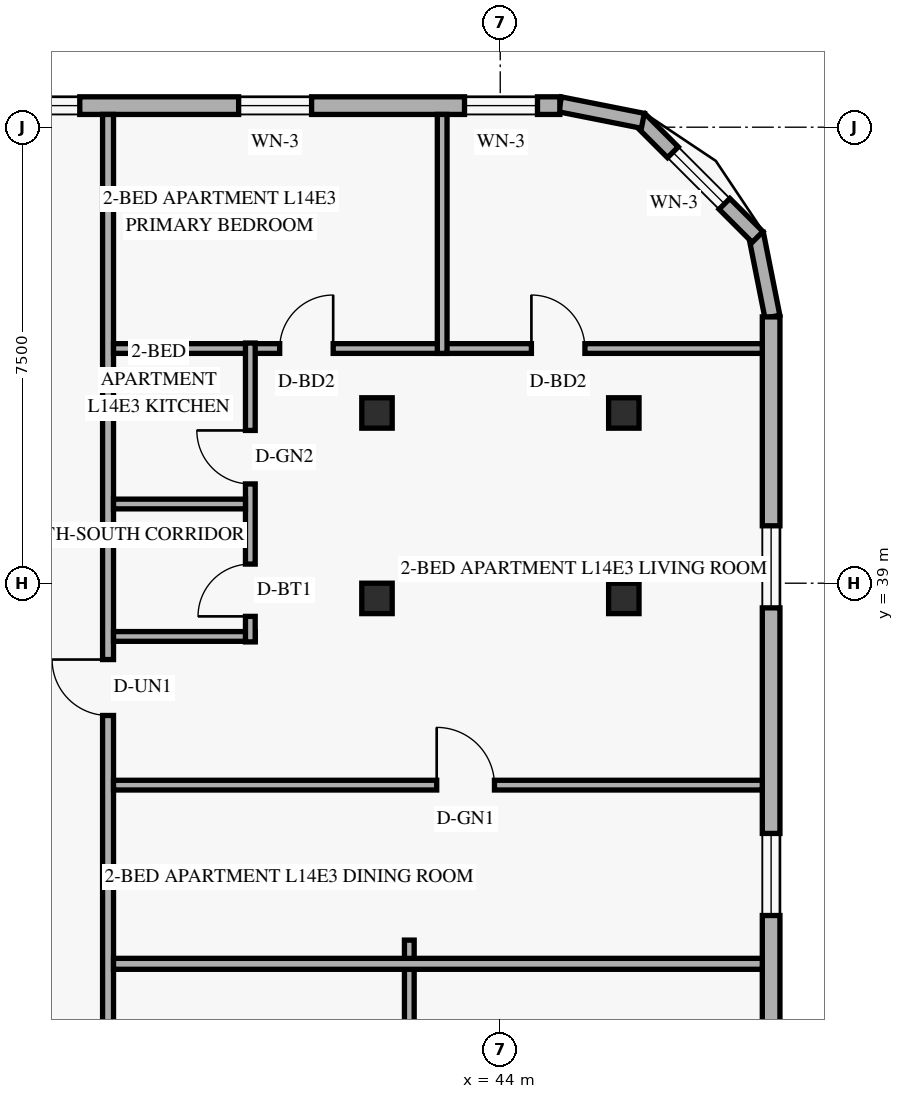
"""IFC4 building model, lengths in metres.
Left out: names, types, materials, properties, quantities, classifications, styles, units other than length and angle.
Written with IfcOpenShell. Run it as: python <this file> out.ifc"""

import sys

from ifc_helpers import new_model, si_unit, direction, frame, frame_2d, origin, origin_2d, place, context, subcontext, project, spatial, rectangle, hollow_rectangle, extrude, element, fill, save


model = new_model("IFC4")
c1 = context("Model", 3, precision=1e-05, world=origin(), true_north=direction((0.0, 1.0)))
c2 = subcontext(c1, "Body", "Model", "MODEL_VIEW")
j1 = project(units=[si_unit("LENGTHUNIT", "METRE"), si_unit("PLANEANGLEUNIT", "RADIAN")], contexts=[c1])
p1 = place(None, origin())
s1 = spatial("IfcSite", under=j1, at=p1, CompositionType="ELEMENT")
p2 = place(p1, origin())
s2 = spatial("IfcBuilding", under=s1, at=p2, CompositionType="ELEMENT")
p3 = place(p2, frame((0.0, 0.0, 56.4)))
s3 = spatial("IfcBuildingStorey", under=s2, at=p3, CompositionType="ELEMENT", Elevation=56.4)
for number, where, z_axis, x_axis in (
    (1, (41.91, 38.75, 0.0), (0.035, 0.0, 0.999), (0.0, 1.0, 0.0)),
    (2, (41.91, 41.8, 0.0), (0.035, 0.0, 0.999), (0.0, 1.0, 0.0)),
):
    element("IfcColumn", number, at=place(p3, frame(where, z_axis=z_axis, x_axis=x_axis)), inside=s3, PredefinedType="COLUMN", context=c2, shape_type="SweptSolid", body=[
        extrude(hollow_rectangle(XDim=0.5, YDim=0.5, WallThickness=0.022, at=origin_2d()), origin(), (0.0, 0.0, 1.0), 3.602),
    ])
for number, where, z_axis, x_axis in (
    (3, (45.928, 38.75, 0.0), (0.058, 0.0, 0.998), (0.0, 1.0, 0.0)),
    (4, (45.928, 41.8, 0.0), (0.058, 0.0, 0.998), (0.0, 1.0, 0.0)),
):
    element("IfcColumn", number, at=place(p3, frame(where, z_axis=z_axis, x_axis=x_axis)), inside=s3, PredefinedType="COLUMN", context=c2, shape_type="SweptSolid", body=[
        extrude(hollow_rectangle(XDim=0.5, YDim=0.5, WallThickness=0.022, at=origin_2d()), origin(), (0.0, 0.0, 1.0), 3.606),
    ])
p4 = place(p3, frame((48.476, 43.384, 0.0), z_axis=(0.0, 0.0, 1.0), x_axis=(-0.19496651342, 0.980809899341, 0.0)))
e5 = element("IfcWall", 5, at=p4, inside=s3, PredefinedType="SOLIDWALL", context=c2, shape_type="SweptSolid", body=[
    extrude(rectangle(XDim=1.389, YDim=0.25, at=frame_2d((0.694, 0.0))), origin(), (0.0, 0.0, 1.0), 3.35),
])
p5 = place(p3, frame((48.232, 44.695, 0.0), z_axis=(0.0, 0.0, 1.0), x_axis=(-0.707106781187, 0.707106781187, 0.0)))
e6 = element("IfcWall", 6, at=p5, inside=s3, PredefinedType="SOLIDWALL", context=c2, shape_type="SweptSolid", body=[
    extrude(rectangle(XDim=2.739, YDim=0.25, at=frame_2d((1.37, 0.0))), origin(), (0.0, 0.0, 1.0), 3.35),
])
p6 = place(p5, frame((0.77, 0.0, 0.85)))
e7 = element("IfcOpeningElement", 7, at=p6, cuts=e6, PredefinedType="OPENING", context=c2, shape_type="SweptSolid", body=[
    extrude(rectangle(XDim=1.2, YDim=1.5, at=frame_2d((0.6, 0.75))), frame((0.0, 0.135, 0.0), z_axis=(0.0, -1.0, 0.0), x_axis=(1.0, 0.0, 0.0)), (0.0, 0.0, 1.0), 0.27),
])
p7 = place(p3, frame((46.345, 46.605, 0.0), z_axis=(0.0, 0.0, 1.0), x_axis=(-0.980809899341, 0.19496651342, 0.0)))
e8 = element("IfcWall", 8, at=p7, inside=s3, PredefinedType="SOLIDWALL", context=c2, shape_type="SweptSolid", body=[
    extrude(rectangle(XDim=1.389, YDim=0.25, at=frame_2d((0.694, 0.0))), origin(), (0.0, 0.0, 1.0), 3.35),
])
p8 = place(p3, frame((48.455, 4.62, 0.0), z_axis=(0.0, 0.0, 1.0), x_axis=(0.0, 1.0, 0.0)))
e9 = element("IfcWall", 9, at=p8, inside=s3, PredefinedType="SOLIDWALL", context=c2, shape_type="SweptSolid", body=[
    extrude(rectangle(XDim=38.76, YDim=0.29, at=frame_2d((19.38, 0.0))), origin(), (0.0, 0.0, 1.0), 3.35),
])
p9 = place(p8, frame((5.565, 0.0, 0.85)))
e10 = element("IfcOpeningElement", 10, at=p9, cuts=e9, PredefinedType="OPENING", context=c2, shape_type="SweptSolid", body=[
    extrude(rectangle(XDim=1.35, YDim=1.55, at=frame_2d((0.675, 0.775))), frame((0.0, 0.155, 0.0), z_axis=(0.0, -1.0, 0.0), x_axis=(1.0, 0.0, 0.0)), (0.0, 0.0, 1.0), 0.31),
])
p10 = place(p8, frame((13.709, 0.0, 0.85)))
e11 = element("IfcOpeningElement", 11, at=p10, cuts=e9, PredefinedType="OPENING", context=c2, shape_type="SweptSolid", body=[
    extrude(rectangle(XDim=1.35, YDim=1.55, at=frame_2d((0.675, 0.775))), frame((0.0, 0.155, 0.0), z_axis=(0.0, -1.0, 0.0), x_axis=(1.0, 0.0, 0.0)), (0.0, 0.0, 1.0), 0.31),
])
p11 = place(p8, frame((19.284, 0.0, 0.85)))
e12 = element("IfcOpeningElement", 12, at=p11, cuts=e9, PredefinedType="OPENING", context=c2, shape_type="SweptSolid", body=[
    extrude(rectangle(XDim=1.35, YDim=1.55, at=frame_2d((0.675, 0.775))), frame((0.0, 0.155, 0.0), z_axis=(0.0, -1.0, 0.0), x_axis=(1.0, 0.0, 0.0)), (0.0, 0.0, 1.0), 0.31),
])
p12 = place(p8, frame((25.2, 0.0, 0.85)))
e13 = element("IfcOpeningElement", 13, at=p12, cuts=e9, PredefinedType="OPENING", context=c2, shape_type="SweptSolid", body=[
    extrude(rectangle(XDim=1.35, YDim=1.55, at=frame_2d((0.675, 0.775))), frame((0.0, 0.155, 0.0), z_axis=(0.0, -1.0, 0.0), x_axis=(1.0, 0.0, 0.0)), (0.0, 0.0, 1.0), 0.31),
])
p13 = place(p8, frame((28.914, 0.0, 0.85)))
e14 = element("IfcOpeningElement", 14, at=p13, cuts=e9, PredefinedType="OPENING", context=c2, shape_type="SweptSolid", body=[
    extrude(rectangle(XDim=1.35, YDim=1.55, at=frame_2d((0.675, 0.775))), frame((0.0, 0.155, 0.0), z_axis=(0.0, -1.0, 0.0), x_axis=(1.0, 0.0, 0.0)), (0.0, 0.0, 1.0), 0.31),
])
p14 = place(p8, frame((33.975, 0.0, 0.85)))
e15 = element("IfcOpeningElement", 15, at=p14, cuts=e9, PredefinedType="OPENING", context=c2, shape_type="SweptSolid", body=[
    extrude(rectangle(XDim=1.35, YDim=1.55, at=frame_2d((0.675, 0.775))), frame((0.0, 0.155, 0.0), z_axis=(0.0, -1.0, 0.0), x_axis=(1.0, 0.0, 0.0)), (0.0, 0.0, 1.0), 0.31),
])
p15 = place(p3, frame((44.98, 46.855, 0.0), z_axis=(0.0, 0.0, 1.0), x_axis=(-1.0, 0.0, 0.0)))
e16 = element("IfcWall", 16, at=p15, inside=s3, PredefinedType="SOLIDWALL", context=c2, shape_type="SweptSolid", body=[
    extrude(rectangle(XDim=39.56, YDim=0.29, at=frame_2d((19.78, 0.0))), origin(), (0.0, 0.0, 1.0), 3.35),
])
p16 = place(p15, frame((30.845, 0.0, 0.85)))
e17 = element("IfcOpeningElement", 17, at=p16, cuts=e16, PredefinedType="OPENING", context=c2, shape_type="SweptSolid", body=[
    extrude(rectangle(XDim=1.2, YDim=1.5, at=frame_2d((0.6, 0.75))), frame((0.0, 0.155, 0.0), z_axis=(0.0, -1.0, 0.0), x_axis=(1.0, 0.0, 0.0)), (0.0, 0.0, 1.0), 0.31),
])
p17 = place(p15, frame((21.68, 0.0, 0.85)))
e18 = element("IfcOpeningElement", 18, at=p17, cuts=e16, PredefinedType="OPENING", context=c2, shape_type="SweptSolid", body=[
    extrude(rectangle(XDim=1.2, YDim=1.5, at=frame_2d((0.6, 0.75))), frame((0.0, 0.155, 0.0), z_axis=(0.0, -1.0, 0.0), x_axis=(1.0, 0.0, 0.0)), (0.0, 0.0, 1.0), 0.31),
])
p18 = place(p15, frame((17.829, 0.0, 0.85)))
e19 = element("IfcOpeningElement", 19, at=p18, cuts=e16, PredefinedType="OPENING", context=c2, shape_type="SweptSolid", body=[
    extrude(rectangle(XDim=1.2, YDim=1.5, at=frame_2d((0.6, 0.75))), frame((0.0, 0.155, 0.0), z_axis=(0.0, -1.0, 0.0), x_axis=(1.0, 0.0, 0.0)), (0.0, 0.0, 1.0), 0.31),
])
p19 = place(p15, frame((11.994, 0.0, 0.85)))
e20 = element("IfcOpeningElement", 20, at=p19, cuts=e16, PredefinedType="OPENING", context=c2, shape_type="SweptSolid", body=[
    extrude(rectangle(XDim=1.2, YDim=1.5, at=frame_2d((0.6, 0.75))), frame((0.0, 0.155, 0.0), z_axis=(0.0, -1.0, 0.0), x_axis=(1.0, 0.0, 0.0)), (0.0, 0.0, 1.0), 0.31),
])
p20 = place(p15, frame((7.895, 0.0, 0.85)))
e21 = element("IfcOpeningElement", 21, at=p20, cuts=e16, PredefinedType="OPENING", context=c2, shape_type="SweptSolid", body=[
    extrude(rectangle(XDim=1.2, YDim=1.5, at=frame_2d((0.6, 0.75))), frame((0.0, 0.155, 0.0), z_axis=(0.0, -1.0, 0.0), x_axis=(1.0, 0.0, 0.0)), (0.0, 0.0, 1.0), 0.31),
])
p21 = place(p15, frame((4.083, 0.0, 0.85)))
e22 = element("IfcOpeningElement", 22, at=p21, cuts=e16, PredefinedType="OPENING", context=c2, shape_type="SweptSolid", body=[
    extrude(rectangle(XDim=1.2, YDim=1.5, at=frame_2d((0.6, 0.75))), frame((0.0, 0.155, 0.0), z_axis=(0.0, -1.0, 0.0), x_axis=(1.0, 0.0, 0.0)), (0.0, 0.0, 1.0), 0.31),
])
p22 = place(p15, frame((0.367, 0.0, 0.85)))
e23 = element("IfcOpeningElement", 23, at=p22, cuts=e16, PredefinedType="OPENING", context=c2, shape_type="SweptSolid", body=[
    extrude(rectangle(XDim=1.2, YDim=1.5, at=frame_2d((0.6, 0.75))), frame((0.0, 0.155, 0.0), z_axis=(0.0, -1.0, 0.0), x_axis=(1.0, 0.0, 0.0)), (0.0, 0.0, 1.0), 0.31),
])
p23 = place(p3, frame((37.55, 1.29, 0.0), z_axis=(0.0, 0.0, 1.0), x_axis=(0.0, 1.0, 0.0)))
e24 = element("IfcWall", 24, at=p23, inside=s3, PredefinedType="STANDARD", context=c2, shape_type="SweptSolid", body=[
    extrude(rectangle(XDim=45.42, YDim=0.18, at=frame_2d((22.71, 0.0))), origin(), (0.0, 0.0, 1.0), 2.639),
])
p24 = place(p23, frame((9.87, 0.0, 0.0)))
e25 = element("IfcOpeningElement", 25, at=p24, cuts=e24, PredefinedType="OPENING", context=c2, shape_type="SweptSolid", body=[
    extrude(rectangle(XDim=0.92, YDim=2.15, at=frame_2d((0.46, 1.075))), frame((0.0, 0.1, 0.0), z_axis=(0.0, -1.0, 0.0), x_axis=(1.0, 0.0, 0.0)), (0.0, 0.0, 1.0), 0.2),
])
p25 = place(p23, frame((20.953, 0.0, 0.0)))
e26 = element("IfcOpeningElement", 26, at=p25, cuts=e24, PredefinedType="OPENING", context=c2, shape_type="SweptSolid", body=[
    extrude(rectangle(XDim=0.92, YDim=2.15, at=frame_2d((0.46, 1.075))), frame((0.0, 0.1, 0.0), z_axis=(0.0, -1.0, 0.0), x_axis=(1.0, 0.0, 0.0)), (0.0, 0.0, 1.0), 0.2),
])
p26 = place(p23, frame((35.534, 0.0, 0.0)))
e27 = element("IfcOpeningElement", 27, at=p26, cuts=e24, PredefinedType="OPENING", context=c2, shape_type="SweptSolid", body=[
    extrude(rectangle(XDim=0.92, YDim=2.15, at=frame_2d((0.46, 1.075))), frame((0.0, 0.1, 0.0), z_axis=(0.0, -1.0, 0.0), x_axis=(1.0, 0.0, 0.0)), (0.0, 0.0, 1.0), 0.2),
])
p27 = place(p3, frame((42.504, 28.17, 0.0), z_axis=(0.0, 0.0, 1.0), x_axis=(0.0, 1.0, 0.0)))
e28 = element("IfcWall", 28, at=p27, inside=s3, PredefinedType="PARTITIONING", context=c2, shape_type="SweptSolid", body=[
    extrude(rectangle(XDim=4.96, YDim=0.16, at=frame_2d((2.48, 0.0))), origin(), (0.0, 0.0, 1.0), 2.639),
])
p28 = place(p3, frame((37.64, 32.74, 0.0), z_axis=(0.0, 0.0, 1.0), x_axis=(1.0, 0.0, 0.0)))
e29 = element("IfcWall", 29, at=p28, inside=s3, PredefinedType="PARTITIONING", context=c2, shape_type="SweptSolid", body=[
    extrude(rectangle(XDim=10.67, YDim=0.18, at=frame_2d((5.335, 0.0))), origin(), (0.0, 0.0, 1.0), 2.639),
])
p29 = place(p3, frame((37.64, 42.86, 0.0), z_axis=(0.0, 0.0, 1.0), x_axis=(1.0, 0.0, 0.0)))
e30 = element("IfcWall", 30, at=p29, inside=s3, PredefinedType="PARTITIONING", context=c2, shape_type="SweptSolid", body=[
    extrude(rectangle(XDim=10.67, YDim=0.16, at=frame_2d((5.335, 0.0))), origin(), (0.0, 0.0, 1.0), 3.35),
])
p30 = place(p29, frame((2.732, 0.0, 0.0)))
e31 = element("IfcOpeningElement", 31, at=p30, cuts=e30, PredefinedType="OPENING", context=c2, shape_type="SweptSolid", body=[
    extrude(rectangle(XDim=0.88, YDim=2.14, at=frame_2d((0.44, 1.07))), frame((0.0, 0.09, 0.0), z_axis=(0.0, -1.0, 0.0), x_axis=(1.0, 0.0, 0.0)), (0.0, 0.0, 1.0), 0.18),
])
p31 = place(p29, frame((6.873, 0.0, 0.0)))
e32 = element("IfcOpeningElement", 32, at=p31, cuts=e30, PredefinedType="OPENING", context=c2, shape_type="SweptSolid", body=[
    extrude(rectangle(XDim=0.88, YDim=2.14, at=frame_2d((0.44, 1.07))), frame((0.0, 0.09, 0.0), z_axis=(0.0, -1.0, 0.0), x_axis=(1.0, 0.0, 0.0)), (0.0, 0.0, 1.0), 0.18),
])
p32 = place(p3, frame((37.64, 38.125, 0.0), z_axis=(0.0, 0.0, 1.0), x_axis=(1.0, 0.0, 0.0)))
e33 = element("IfcWall", 33, at=p32, inside=s3, PredefinedType="PLUMBINGWALL", context=c2, shape_type="SweptSolid", body=[
    extrude(rectangle(XDim=2.33, YDim=0.16, at=frame_2d((1.165, 0.0))), origin(), (0.0, 0.0, 1.0), 3.35),
])
p33 = place(p3, frame((39.89, 38.034, 0.0), z_axis=(0.0, 0.0, 1.0), x_axis=(0.0, 1.0, 0.0)))
e34 = element("IfcWall", 34, at=p33, inside=s3, PredefinedType="PLUMBINGWALL", context=c2, shape_type="SweptSolid", body=[
    extrude(rectangle(XDim=4.916, YDim=0.16, at=frame_2d((2.458, 0.0))), origin(), (0.0, 0.0, 1.0), 2.639),
])
p34 = place(p33, frame((0.42, 0.0, 0.0)))
e35 = element("IfcOpeningElement", 35, at=p34, cuts=e34, PredefinedType="OPENING", context=c2, shape_type="SweptSolid", body=[
    extrude(rectangle(XDim=0.86, YDim=2.12, at=frame_2d((0.43, 1.06))), frame((0.0, 0.09, 0.0), z_axis=(0.0, -1.0, 0.0), x_axis=(1.0, 0.0, 0.0)), (0.0, 0.0, 1.0), 0.18),
])
p35 = place(p33, frame((2.598, 0.0, 0.0)))
e36 = element("IfcOpeningElement", 36, at=p35, cuts=e34, PredefinedType="OPENING", context=c2, shape_type="SweptSolid", body=[
    extrude(rectangle(XDim=0.88, YDim=2.12, at=frame_2d((0.44, 1.06))), frame((0.0, 0.09, 0.0), z_axis=(0.0, -1.0, 0.0), x_axis=(1.0, 0.0, 0.0)), (0.0, 0.0, 1.0), 0.18),
])
p36 = place(p3, frame((37.64, 40.303, 0.0), z_axis=(0.0, 0.0, 1.0), x_axis=(1.0, 0.0, 0.0)))
e37 = element("IfcWall", 37, at=p36, inside=s3, PredefinedType="PLUMBINGWALL", context=c2, shape_type="SweptSolid", body=[
    extrude(rectangle(XDim=2.17, YDim=0.16, at=frame_2d((1.085, 0.0))), origin(), (0.0, 0.0, 1.0), 3.35),
])
p37 = place(p3, frame((37.64, 35.679, 0.0), z_axis=(0.0, 0.0, 1.0), x_axis=(1.0, 0.0, 0.0)))
e38 = element("IfcWall", 38, at=p37, inside=s3, PredefinedType="PARTITIONING", context=c2, shape_type="SweptSolid", body=[
    extrude(rectangle(XDim=10.67, YDim=0.16, at=frame_2d((5.335, 0.0))), origin(), (0.0, 0.0, 1.0), 2.639),
])
p38 = place(p37, frame((5.315, 0.0, 0.0)))
e39 = element("IfcOpeningElement", 39, at=p38, cuts=e38, PredefinedType="OPENING", context=c2, shape_type="SweptSolid", body=[
    extrude(rectangle(XDim=0.95, YDim=2.15, at=frame_2d((0.475, 1.075))), frame((0.0, 0.09, 0.0), z_axis=(0.0, -1.0, 0.0), x_axis=(1.0, 0.0, 0.0)), (0.0, 0.0, 1.0), 0.18),
])
p39 = place(p3, frame((43.045, 42.78, 0.0), z_axis=(0.0, 0.0, 1.0), x_axis=(0.0, 1.0, 0.0)))
e40 = element("IfcWall", 40, at=p39, inside=s3, PredefinedType="PARTITIONING", context=c2, shape_type="SweptSolid", body=[
    extrude(rectangle(XDim=3.93, YDim=0.16, at=frame_2d((1.965, 0.0))), origin(), (0.0, 0.0, 1.0), 3.35),
])
p40 = place(p6, origin())
e41 = element("IfcWindow", 41, at=p40, inside=s3, PartitioningType="SINGLE_PANEL", PredefinedType="WINDOW", context=c2, shape_type="SweptSolid", body=[
    extrude(rectangle(XDim=1.2, YDim=1.5, at=frame_2d((0.6, 0.75))), frame((0.0, 0.03, 0.0), z_axis=(0.0, -1.0, 0.0), x_axis=(1.0, 0.0, 0.0)), (0.0, 0.0, 1.0), 0.06),
])
fill(e7, e41)
p41 = place(p13, origin())
e42 = element("IfcWindow", 42, at=p41, inside=s3, PartitioningType="SINGLE_PANEL", PredefinedType="WINDOW", context=c2, shape_type="SweptSolid", body=[
    extrude(rectangle(XDim=1.35, YDim=1.55, at=frame_2d((0.675, 0.775))), frame((0.0, 0.03, 0.0), z_axis=(0.0, -1.0, 0.0), x_axis=(1.0, 0.0, 0.0)), (0.0, 0.0, 1.0), 0.06),
])
fill(e14, e42)
p42 = place(p14, origin())
e43 = element("IfcWindow", 43, at=p42, inside=s3, PartitioningType="SINGLE_PANEL", PredefinedType="WINDOW", context=c2, shape_type="SweptSolid", body=[
    extrude(rectangle(XDim=1.35, YDim=1.55, at=frame_2d((0.675, 0.775))), frame((0.0, 0.03, 0.0), z_axis=(0.0, -1.0, 0.0), x_axis=(1.0, 0.0, 0.0)), (0.0, 0.0, 1.0), 0.06),
])
fill(e15, e43)
p43 = place(p20, origin())
e44 = element("IfcWindow", 44, at=p43, inside=s3, PartitioningType="SINGLE_PANEL", PredefinedType="WINDOW", context=c2, shape_type="SweptSolid", body=[
    extrude(rectangle(XDim=1.2, YDim=1.5, at=frame_2d((0.6, 0.75))), frame((0.0, 0.03, 0.0), z_axis=(0.0, -1.0, 0.0), x_axis=(1.0, 0.0, 0.0)), (0.0, 0.0, 1.0), 0.06),
])
fill(e21, e44)
p44 = place(p21, origin())
e45 = element("IfcWindow", 45, at=p44, inside=s3, PartitioningType="SINGLE_PANEL", PredefinedType="WINDOW", context=c2, shape_type="SweptSolid", body=[
    extrude(rectangle(XDim=1.2, YDim=1.5, at=frame_2d((0.6, 0.75))), frame((0.0, 0.03, 0.0), z_axis=(0.0, -1.0, 0.0), x_axis=(1.0, 0.0, 0.0)), (0.0, 0.0, 1.0), 0.06),
])
fill(e22, e45)
p45 = place(p22, origin())
e46 = element("IfcWindow", 46, at=p45, inside=s3, PartitioningType="SINGLE_PANEL", PredefinedType="WINDOW", context=c2, shape_type="SweptSolid", body=[
    extrude(rectangle(XDim=1.2, YDim=1.5, at=frame_2d((0.6, 0.75))), frame((0.0, 0.03, 0.0), z_axis=(0.0, -1.0, 0.0), x_axis=(1.0, 0.0, 0.0)), (0.0, 0.0, 1.0), 0.06),
])
fill(e23, e46)
p46 = place(p38, origin())
e47 = element("IfcDoor", 47, at=p46, inside=s3, OperationType="SINGLE_SWING_LEFT", PredefinedType="DOOR", context=c2, shape_type="SweptSolid", body=[
    extrude(rectangle(XDim=0.95, YDim=2.15, at=frame_2d((0.475, 1.075))), frame((0.0, 0.025, 0.0), z_axis=(0.0, -1.0, 0.0), x_axis=(1.0, 0.0, 0.0)), (0.0, 0.0, 1.0), 0.05),
])
fill(e39, e47)
p47 = place(p26, origin())
e48 = element("IfcDoor", 48, at=p47, inside=s3, OperationType="SINGLE_SWING_RIGHT", PredefinedType="DOOR", context=c2, shape_type="SweptSolid", body=[
    extrude(rectangle(XDim=0.92, YDim=2.15, at=frame_2d((0.46, 1.075))), frame((0.0, 0.025, 0.0), z_axis=(0.0, -1.0, 0.0), x_axis=(1.0, 0.0, 0.0)), (0.0, 0.0, 1.0), 0.05),
])
fill(e27, e48)
p48 = place(p34, origin())
e49 = element("IfcDoor", 49, at=p48, inside=s3, OperationType="SINGLE_SWING_LEFT", PredefinedType="DOOR", context=c2, shape_type="SweptSolid", body=[
    extrude(rectangle(XDim=0.86, YDim=2.12, at=frame_2d((0.43, 1.06))), frame((0.0, 0.025, 0.0), z_axis=(0.0, -1.0, 0.0), x_axis=(1.0, 0.0, 0.0)), (0.0, 0.0, 1.0), 0.05),
])
fill(e35, e49)
p49 = place(p35, origin())
e50 = element("IfcDoor", 50, at=p49, inside=s3, OperationType="SINGLE_SWING_RIGHT", PredefinedType="DOOR", context=c2, shape_type="SweptSolid", body=[
    extrude(rectangle(XDim=0.88, YDim=2.12, at=frame_2d((0.44, 1.06))), frame((0.0, 0.025, 0.0), z_axis=(0.0, -1.0, 0.0), x_axis=(1.0, 0.0, 0.0)), (0.0, 0.0, 1.0), 0.05),
])
fill(e36, e50)
p50 = place(p30, origin())
e51 = element("IfcDoor", 51, at=p50, inside=s3, OperationType="SINGLE_SWING_RIGHT", PredefinedType="DOOR", context=c2, shape_type="SweptSolid", body=[
    extrude(rectangle(XDim=0.88, YDim=2.14, at=frame_2d((0.44, 1.07))), frame((0.0, 0.025, 0.0), z_axis=(0.0, -1.0, 0.0), x_axis=(1.0, 0.0, 0.0)), (0.0, 0.0, 1.0), 0.05),
])
fill(e31, e51)
p51 = place(p31, origin())
e52 = element("IfcDoor", 52, at=p51, inside=s3, OperationType="SINGLE_SWING_LEFT", PredefinedType="DOOR", context=c2, shape_type="SweptSolid", body=[
    extrude(rectangle(XDim=0.88, YDim=2.14, at=frame_2d((0.44, 1.07))), frame((0.0, 0.025, 0.0), z_axis=(0.0, -1.0, 0.0), x_axis=(1.0, 0.0, 0.0)), (0.0, 0.0, 1.0), 0.05),
])
fill(e32, e52)
save(model, sys.argv[1])
